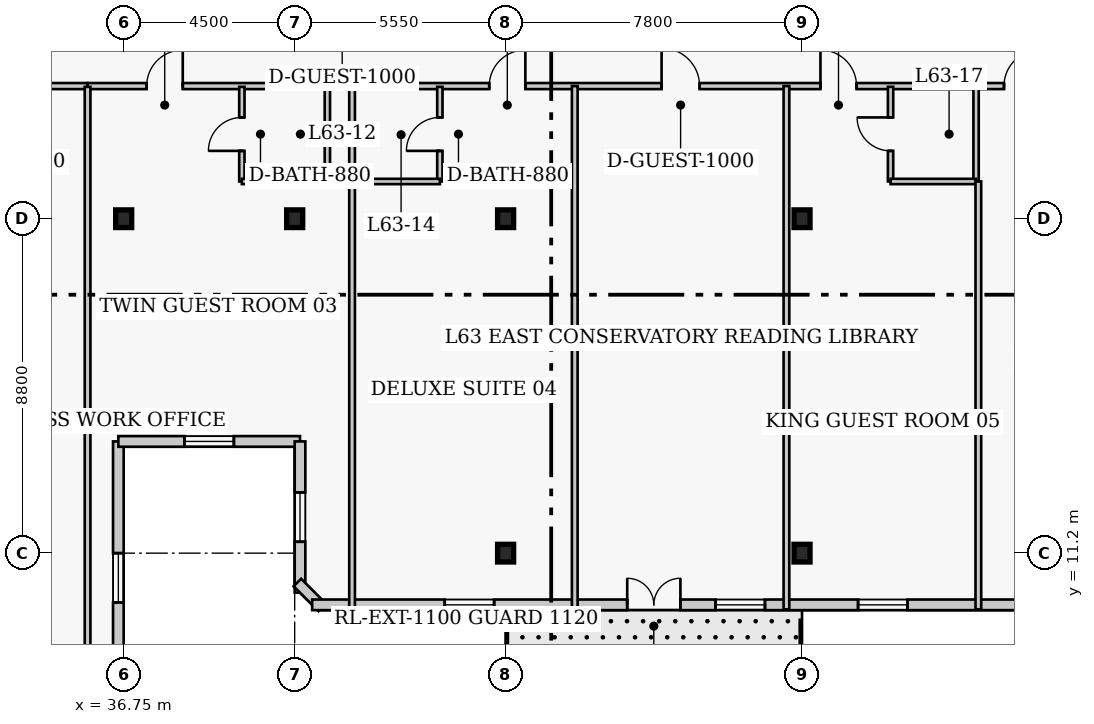
"""IFC4 building model, lengths in metres.
Left out: names, types, materials, properties, quantities, classifications, styles, units other than length and angle.
Written with IfcOpenShell. Run it as: python <this file> out.ifc"""

import sys

from ifc_helpers import new_model, si_unit, direction, frame, frame_2d, origin, origin_2d, place, context, subcontext, project, spatial, rectangle, i_section, extrude, element, fill, save


model = new_model("IFC4")
c1 = context("Model", 3, precision=1e-05, world=origin(), true_north=direction((0.0, 1.0)))
c2 = subcontext(c1, "Body", "Model", "MODEL_VIEW")
j1 = project(units=[si_unit("LENGTHUNIT", "METRE"), si_unit("PLANEANGLEUNIT", "RADIAN")], contexts=[c1])
p1 = place(None, origin())
s1 = spatial("IfcSite", under=j1, at=p1, CompositionType="ELEMENT")
p2 = place(p1, origin())
s2 = spatial("IfcBuilding", under=s1, at=p2, CompositionType="ELEMENT")
p3 = place(p2, frame((0.0, 0.0, 253.4)))
s3 = spatial("IfcBuildingStorey", under=s2, at=p3, CompositionType="ELEMENT", Elevation=253.4)
for number, where, z_axis, x_axis in (
    (1, (36.75, 20.0, 0.0), (0.0, 0.0, 1.0), (1.0, 0.0, 0.0)),
    (2, (41.25, 20.0, 0.0), (0.0, 0.0, 1.0), (1.0, 0.0, 0.0)),
    (3, (46.8, 11.2, 0.0), (0.0, 0.0, 1.0), (1.0, 0.0, 0.0)),
    (4, (46.8, 20.0, 0.0), (0.0, 0.0, 1.0), (1.0, 0.0, 0.0)),
    (5, (54.6, 11.2, 0.0), (0.0, 0.0, 1.0), (1.0, 0.0, 0.0)),
    (6, (54.6, 20.0, 0.0), (0.0, 0.0, 1.0), (1.0, 0.0, 0.0)),
):
    element("IfcColumn", number, at=place(p3, frame(where, z_axis=z_axis, x_axis=x_axis)), inside=s3, PredefinedType="COLUMN", context=c2, shape_type="SweptSolid", body=[
        extrude(i_section(OverallWidth=0.422, OverallDepth=0.465, WebThickness=0.045, FlangeThickness=0.073, FilletRadius=0.017, at=origin_2d()), origin(), (0.0, 0.0, 1.0), 4.0),
    ])
p4 = place(p3, frame((36.61, 6.96, 0.0), z_axis=(0.0, 0.0, 1.0), x_axis=(0.0, 1.0, 0.0)))
e7 = element("IfcWall", 7, at=p4, inside=s3, PredefinedType="SOLIDWALL", context=c2, shape_type="SweptSolid", body=[
    extrude(rectangle(XDim=7.18, YDim=0.28, at=frame_2d((3.59, 0.0))), origin(), (0.0, 0.0, 1.0), 3.76),
])
p5 = place(p4, frame((2.94, 0.0, 0.85)))
e8 = element("IfcOpeningElement", 8, at=p5, cuts=e7, PredefinedType="OPENING", context=c2, shape_type="SweptSolid", body=[
    extrude(rectangle(XDim=1.3, YDim=1.7, at=frame_2d((0.65, 0.85))), frame((0.0, 0.15, 0.0), z_axis=(0.0, -1.0, 0.0), x_axis=(1.0, 0.0, 0.0)), (0.0, 0.0, 1.0), 0.3),
])
p6 = place(p3, frame((36.61, 14.14, 0.0), z_axis=(0.0, 0.0, 1.0), x_axis=(1.0, 0.0, 0.0)))
e9 = element("IfcWall", 9, at=p6, inside=s3, PredefinedType="SOLIDWALL", context=c2, shape_type="SweptSolid", body=[
    extrude(rectangle(XDim=4.78, YDim=0.28, at=frame_2d((2.39, 0.0))), origin(), (0.0, 0.0, 1.0), 3.76),
])
p7 = place(p6, frame((1.74, 0.0, 0.85)))
e10 = element("IfcOpeningElement", 10, at=p7, cuts=e9, PredefinedType="OPENING", context=c2, shape_type="SweptSolid", body=[
    extrude(rectangle(XDim=1.3, YDim=1.7, at=frame_2d((0.65, 0.85))), frame((0.0, 0.15, 0.0), z_axis=(0.0, -1.0, 0.0), x_axis=(1.0, 0.0, 0.0)), (0.0, 0.0, 1.0), 0.3),
])
p8 = place(p3, frame((41.39, 14.14, 0.0), z_axis=(0.0, 0.0, 1.0), x_axis=(0.0, -1.0, 0.0)))
e11 = element("IfcWall", 11, at=p8, inside=s3, PredefinedType="SOLIDWALL", context=c2, shape_type="SweptSolid", body=[
    extrude(rectangle(XDim=3.98, YDim=0.28, at=frame_2d((1.99, 0.0))), origin(), (0.0, 0.0, 1.0), 3.76),
])
p9 = place(p8, frame((1.34, 0.0, 0.85)))
e12 = element("IfcOpeningElement", 12, at=p9, cuts=e11, PredefinedType="OPENING", context=c2, shape_type="SweptSolid", body=[
    extrude(rectangle(XDim=1.3, YDim=1.7, at=frame_2d((0.65, 0.85))), frame((0.0, 0.15, 0.0), z_axis=(0.0, -1.0, 0.0), x_axis=(1.0, 0.0, 0.0)), (0.0, 0.0, 1.0), 0.3),
])
p10 = place(p3, frame((41.321, 10.427, 0.0), z_axis=(0.0, 0.0, 1.0), x_axis=(0.707106781187, -0.707106781187, 0.0)))
e13 = element("IfcWall", 13, at=p10, inside=s3, PredefinedType="SOLIDWALL", context=c2, shape_type="SweptSolid", body=[
    extrude(rectangle(XDim=0.928, YDim=0.28, at=frame_2d((0.464, 0.0))), origin(), (0.0, 0.0, 1.0), 3.76),
])
p11 = place(p3, frame((41.71, 9.84, 0.0), z_axis=(0.0, 0.0, 1.0), x_axis=(1.0, 0.0, 0.0)))
e14 = element("IfcWall", 14, at=p11, inside=s3, PredefinedType="SOLIDWALL", context=c2, shape_type="SweptSolid", body=[
    extrude(rectangle(XDim=24.83, YDim=0.28, at=frame_2d((12.415, 0.0))), origin(), (0.0, 0.0, 1.0), 3.76),
])
p12 = place(p11, frame((8.29, 0.0, 0.0)))
e15 = element("IfcOpeningElement", 15, at=p12, cuts=e14, PredefinedType="OPENING", context=c2, shape_type="SweptSolid", body=[
    extrude(rectangle(XDim=1.4, YDim=2.15, at=frame_2d((0.7, 1.075))), frame((0.0, 0.15, 0.0), z_axis=(0.0, -1.0, 0.0), x_axis=(1.0, 0.0, 0.0)), (0.0, 0.0, 1.0), 0.3),
])
p13 = place(p11, frame((3.488, 0.0, 0.85)))
e16 = element("IfcOpeningElement", 16, at=p13, cuts=e14, PredefinedType="OPENING", context=c2, shape_type="SweptSolid", body=[
    extrude(rectangle(XDim=1.3, YDim=1.7, at=frame_2d((0.65, 0.85))), frame((0.0, 0.15, 0.0), z_axis=(0.0, -1.0, 0.0), x_axis=(1.0, 0.0, 0.0)), (0.0, 0.0, 1.0), 0.3),
])
p14 = place(p11, frame((10.615, 0.0, 0.85)))
e17 = element("IfcOpeningElement", 17, at=p14, cuts=e14, PredefinedType="OPENING", context=c2, shape_type="SweptSolid", body=[
    extrude(rectangle(XDim=1.3, YDim=1.7, at=frame_2d((0.65, 0.85))), frame((0.0, 0.15, 0.0), z_axis=(0.0, -1.0, 0.0), x_axis=(1.0, 0.0, 0.0)), (0.0, 0.0, 1.0), 0.3),
])
p15 = place(p11, frame((18.892, 0.0, 0.85)))
e18 = element("IfcOpeningElement", 18, at=p15, cuts=e14, PredefinedType="OPENING", context=c2, shape_type="SweptSolid", body=[
    extrude(rectangle(XDim=1.3, YDim=1.7, at=frame_2d((0.65, 0.85))), frame((0.0, 0.15, 0.0), z_axis=(0.0, -1.0, 0.0), x_axis=(1.0, 0.0, 0.0)), (0.0, 0.0, 1.0), 0.3),
])
p16 = place(p11, frame((14.365, 0.0, 0.85)))
e19 = element("IfcOpeningElement", 19, at=p16, cuts=e14, PredefinedType="OPENING", context=c2, shape_type="SweptSolid", body=[
    extrude(rectangle(XDim=1.3, YDim=1.7, at=frame_2d((0.65, 0.85))), frame((0.0, 0.15, 0.0), z_axis=(0.0, -1.0, 0.0), x_axis=(1.0, 0.0, 0.0)), (0.0, 0.0, 1.0), 0.3),
])
p17 = place(p3, frame((19.9, 23.49, 0.0), z_axis=(0.0, 0.0, 1.0), x_axis=(1.0, 0.0, 0.0)))
e20 = element("IfcWall", 20, at=p17, inside=s3, PredefinedType="PARTITIONING", context=c2, shape_type="SweptSolid", body=[
    extrude(rectangle(XDim=15.9, YDim=0.16, at=frame_2d((7.95, 0.0))), origin(), (0.0, 0.0, 1.0), 3.76),
])
p18 = place(p17, frame((3.61, 0.0, 0.0)))
e21 = element("IfcOpeningElement", 21, at=p18, cuts=e20, PredefinedType="OPENING", context=c2, shape_type="SweptSolid", body=[
    extrude(rectangle(XDim=0.95, YDim=2.1, at=frame_2d((0.475, 1.05))), frame((0.0, 0.09, 0.0), z_axis=(0.0, -1.0, 0.0), x_axis=(1.0, 0.0, 0.0)), (0.0, 0.0, 1.0), 0.18),
])
p19 = place(p17, frame((9.005, 0.0, 0.0)))
e22 = element("IfcOpeningElement", 22, at=p19, cuts=e20, PredefinedType="OPENING", context=c2, shape_type="SweptSolid", body=[
    extrude(rectangle(XDim=0.95, YDim=2.1, at=frame_2d((0.475, 1.05))), frame((0.0, 0.09, 0.0), z_axis=(0.0, -1.0, 0.0), x_axis=(1.0, 0.0, 0.0)), (0.0, 0.0, 1.0), 0.18),
])
p20 = place(p17, frame((12.875, 0.0, 0.0)))
e23 = element("IfcOpeningElement", 23, at=p20, cuts=e20, PredefinedType="OPENING", context=c2, shape_type="SweptSolid", body=[
    extrude(rectangle(XDim=1.0, YDim=2.15, at=frame_2d((0.5, 1.075))), frame((0.0, 0.09, 0.0), z_axis=(0.0, -1.0, 0.0), x_axis=(1.0, 0.0, 0.0)), (0.0, 0.0, 1.0), 0.18),
])
p21 = place(p3, frame((35.8, 23.49, 0.0), z_axis=(0.0, 0.0, 1.0), x_axis=(1.0, 0.0, 0.0)))
e24 = element("IfcWall", 24, at=p21, inside=s3, PredefinedType="PARTITIONING", context=c2, shape_type="SweptSolid", body=[
    extrude(rectangle(XDim=25.66, YDim=0.16, at=frame_2d((12.83, 0.0))), origin(), (0.0, 0.0, 1.0), 3.76),
])
p22 = place(p21, frame((1.555, 0.0, 0.0)))
e25 = element("IfcOpeningElement", 25, at=p22, cuts=e24, PredefinedType="OPENING", context=c2, shape_type="SweptSolid", body=[
    extrude(rectangle(XDim=0.95, YDim=2.1, at=frame_2d((0.475, 1.05))), frame((0.0, 0.09, 0.0), z_axis=(0.0, -1.0, 0.0), x_axis=(1.0, 0.0, 0.0)), (0.0, 0.0, 1.0), 0.18),
])
p23 = place(p21, frame((10.57, 0.0, 0.0)))
e26 = element("IfcOpeningElement", 26, at=p23, cuts=e24, PredefinedType="OPENING", context=c2, shape_type="SweptSolid", body=[
    extrude(rectangle(XDim=0.95, YDim=2.1, at=frame_2d((0.475, 1.05))), frame((0.0, 0.09, 0.0), z_axis=(0.0, -1.0, 0.0), x_axis=(1.0, 0.0, 0.0)), (0.0, 0.0, 1.0), 0.18),
])
p24 = place(p21, frame((15.105, 0.0, 0.0)))
e27 = element("IfcOpeningElement", 27, at=p24, cuts=e24, PredefinedType="OPENING", context=c2, shape_type="SweptSolid", body=[
    extrude(rectangle(XDim=1.0, YDim=2.15, at=frame_2d((0.5, 1.075))), frame((0.0, 0.09, 0.0), z_axis=(0.0, -1.0, 0.0), x_axis=(1.0, 0.0, 0.0)), (0.0, 0.0, 1.0), 0.18),
])
p25 = place(p21, frame((19.285, 0.0, 0.0)))
e28 = element("IfcOpeningElement", 28, at=p25, cuts=e24, PredefinedType="OPENING", context=c2, shape_type="SweptSolid", body=[
    extrude(rectangle(XDim=0.95, YDim=2.1, at=frame_2d((0.475, 1.05))), frame((0.0, 0.09, 0.0), z_axis=(0.0, -1.0, 0.0), x_axis=(1.0, 0.0, 0.0)), (0.0, 0.0, 1.0), 0.18),
])
p26 = place(p21, frame((24.115, 0.0, 0.0)))
e29 = element("IfcOpeningElement", 29, at=p26, cuts=e24, PredefinedType="OPENING", context=c2, shape_type="SweptSolid", body=[
    extrude(rectangle(XDim=0.95, YDim=2.1, at=frame_2d((0.475, 1.05))), frame((0.0, 0.09, 0.0), z_axis=(0.0, -1.0, 0.0), x_axis=(1.0, 0.0, 0.0)), (0.0, 0.0, 1.0), 0.18),
])
p27 = place(p3, frame((35.8, 6.52, 0.0), z_axis=(0.0, 0.0, 1.0), x_axis=(0.0, 1.0, 0.0)))
e30 = element("IfcWall", 30, at=p27, inside=s3, PredefinedType="PARTITIONING", context=c2, shape_type="SweptSolid", body=[
    extrude(rectangle(XDim=16.95, YDim=0.15, at=frame_2d((8.475, 0.0))), origin(), (0.0, 0.0, 1.0), 3.76),
])
p28 = place(p3, frame((39.86, 20.98, 0.0), z_axis=(0.0, 0.0, 1.0), x_axis=(0.0, 1.0, 0.0)))
e31 = element("IfcWall", 31, at=p28, inside=s3, PredefinedType="PLUMBINGWALL", context=c2, shape_type="SweptSolid", body=[
    extrude(rectangle(XDim=2.49, YDim=0.14, at=frame_2d((1.245, 0.0))), origin(), (0.0, 0.0, 1.0), 3.76),
])
p29 = place(p28, frame((0.805, 0.0, 0.0)))
e32 = element("IfcOpeningElement", 32, at=p29, cuts=e31, PredefinedType="OPENING", context=c2, shape_type="SweptSolid", body=[
    extrude(rectangle(XDim=0.88, YDim=2.05, at=frame_2d((0.44, 1.025))), frame((0.0, 0.08, 0.0), z_axis=(0.0, -1.0, 0.0), x_axis=(1.0, 0.0, 0.0)), (0.0, 0.0, 1.0), 0.16),
])
p30 = place(p3, frame((42.11, 20.98, 0.0), z_axis=(0.0, 0.0, 1.0), x_axis=(0.0, 1.0, 0.0)))
e33 = element("IfcWall", 33, at=p30, inside=s3, PredefinedType="PLUMBINGWALL", context=c2, shape_type="SweptSolid", body=[
    extrude(rectangle(XDim=2.49, YDim=0.14, at=frame_2d((1.245, 0.0))), origin(), (0.0, 0.0, 1.0), 3.76),
])
p31 = place(p3, frame((39.86, 20.98, 0.0), z_axis=(0.0, 0.0, 1.0), x_axis=(1.0, 0.0, 0.0)))
e34 = element("IfcWall", 34, at=p31, inside=s3, PredefinedType="PLUMBINGWALL", context=c2, shape_type="SweptSolid", body=[
    extrude(rectangle(XDim=2.25, YDim=0.14, at=frame_2d((1.125, 0.0))), origin(), (0.0, 0.0, 1.0), 3.76),
])
p32 = place(p3, frame((42.76, 9.72, 0.0), z_axis=(0.0, 0.0, 1.0), x_axis=(0.0, 1.0, 0.0)))
e35 = element("IfcWall", 35, at=p32, inside=s3, PredefinedType="PARTITIONING", context=c2, shape_type="SweptSolid", body=[
    extrude(rectangle(XDim=13.77, YDim=0.15, at=frame_2d((6.885, 0.0))), origin(), (0.0, 0.0, 1.0), 3.76),
])
p33 = place(p3, frame((45.07, 20.98, 0.0), z_axis=(0.0, 0.0, 1.0), x_axis=(0.0, 1.0, 0.0)))
e36 = element("IfcWall", 36, at=p33, inside=s3, PredefinedType="PLUMBINGWALL", context=c2, shape_type="SweptSolid", body=[
    extrude(rectangle(XDim=2.49, YDim=0.14, at=frame_2d((1.245, 0.0))), origin(), (0.0, 0.0, 1.0), 3.76),
])
p34 = place(p33, frame((0.805, 0.0, 0.0)))
e37 = element("IfcOpeningElement", 37, at=p34, cuts=e36, PredefinedType="OPENING", context=c2, shape_type="SweptSolid", body=[
    extrude(rectangle(XDim=0.88, YDim=2.05, at=frame_2d((0.44, 1.025))), frame((0.0, 0.08, 0.0), z_axis=(0.0, -1.0, 0.0), x_axis=(1.0, 0.0, 0.0)), (0.0, 0.0, 1.0), 0.16),
])
p35 = place(p3, frame((42.82, 20.98, 0.0), z_axis=(0.0, 0.0, 1.0), x_axis=(1.0, 0.0, 0.0)))
e38 = element("IfcWall", 38, at=p35, inside=s3, PredefinedType="PLUMBINGWALL", context=c2, shape_type="SweptSolid", body=[
    extrude(rectangle(XDim=2.25, YDim=0.14, at=frame_2d((1.125, 0.0))), origin(), (0.0, 0.0, 1.0), 3.76),
])
for number, where, z_axis, x_axis in (
    (39, (48.62, 9.72, 0.0), (0.0, 0.0, 1.0), (0.0, 1.0, 0.0)),
    (40, (54.19, 9.72, 0.0), (0.0, 0.0, 1.0), (0.0, 1.0, 0.0)),
):
    element("IfcWall", number, at=place(p3, frame(where, z_axis=z_axis, x_axis=x_axis)), inside=s3, PredefinedType="PARTITIONING", context=c2, shape_type="SweptSolid", body=[
        extrude(rectangle(XDim=13.77, YDim=0.15, at=frame_2d((6.885, 0.0))), origin(), (0.0, 0.0, 1.0), 3.76),
    ])
p36 = place(p3, frame((56.93, 20.98, 0.0), z_axis=(0.0, 0.0, 1.0), x_axis=(0.0, 1.0, 0.0)))
e41 = element("IfcWall", 41, at=p36, inside=s3, PredefinedType="PLUMBINGWALL", context=c2, shape_type="SweptSolid", body=[
    extrude(rectangle(XDim=2.49, YDim=0.14, at=frame_2d((1.245, 0.0))), origin(), (0.0, 0.0, 1.0), 3.76),
])
p37 = place(p36, frame((0.805, 0.0, 0.0)))
e42 = element("IfcOpeningElement", 42, at=p37, cuts=e41, PredefinedType="OPENING", context=c2, shape_type="SweptSolid", body=[
    extrude(rectangle(XDim=0.88, YDim=2.05, at=frame_2d((0.44, 1.025))), frame((0.0, 0.08, 0.0), z_axis=(0.0, -1.0, 0.0), x_axis=(1.0, 0.0, 0.0)), (0.0, 0.0, 1.0), 0.16),
])
p38 = place(p3, frame((59.18, 20.98, 0.0), z_axis=(0.0, 0.0, 1.0), x_axis=(0.0, 1.0, 0.0)))
e43 = element("IfcWall", 43, at=p38, inside=s3, PredefinedType="PLUMBINGWALL", context=c2, shape_type="SweptSolid", body=[
    extrude(rectangle(XDim=2.49, YDim=0.14, at=frame_2d((1.245, 0.0))), origin(), (0.0, 0.0, 1.0), 3.76),
])
p39 = place(p3, frame((56.93, 20.98, 0.0), z_axis=(0.0, 0.0, 1.0), x_axis=(1.0, 0.0, 0.0)))
e44 = element("IfcWall", 44, at=p39, inside=s3, PredefinedType="PLUMBINGWALL", context=c2, shape_type="SweptSolid", body=[
    extrude(rectangle(XDim=2.25, YDim=0.14, at=frame_2d((1.125, 0.0))), origin(), (0.0, 0.0, 1.0), 3.76),
])
p40 = place(p3, frame((59.24, 9.72, 0.0), z_axis=(0.0, 0.0, 1.0), x_axis=(0.0, 1.0, 0.0)))
e45 = element("IfcWall", 45, at=p40, inside=s3, PredefinedType="PARTITIONING", context=c2, shape_type="SweptSolid", body=[
    extrude(rectangle(XDim=11.26, YDim=0.15, at=frame_2d((5.63, 0.0))), origin(), (0.0, 0.0, 1.0), 3.76),
])
p41 = place(p5, origin())
e46 = element("IfcWindow", 46, at=p41, inside=s3, PartitioningType="SINGLE_PANEL", PredefinedType="WINDOW", context=c2, shape_type="SweptSolid", body=[
    extrude(rectangle(XDim=1.3, YDim=1.7, at=frame_2d((0.65, 0.85))), frame((0.0, 0.03, 0.0), z_axis=(0.0, -1.0, 0.0), x_axis=(1.0, 0.0, 0.0)), (0.0, 0.0, 1.0), 0.06),
])
fill(e8, e46)
p42 = place(p7, origin())
e47 = element("IfcWindow", 47, at=p42, inside=s3, PartitioningType="SINGLE_PANEL", PredefinedType="WINDOW", context=c2, shape_type="SweptSolid", body=[
    extrude(rectangle(XDim=1.3, YDim=1.7, at=frame_2d((0.65, 0.85))), frame((0.0, 0.03, 0.0), z_axis=(0.0, -1.0, 0.0), x_axis=(1.0, 0.0, 0.0)), (0.0, 0.0, 1.0), 0.06),
])
fill(e10, e47)
p43 = place(p9, origin())
e48 = element("IfcWindow", 48, at=p43, inside=s3, PartitioningType="SINGLE_PANEL", PredefinedType="WINDOW", context=c2, shape_type="SweptSolid", body=[
    extrude(rectangle(XDim=1.3, YDim=1.7, at=frame_2d((0.65, 0.85))), frame((0.0, 0.03, 0.0), z_axis=(0.0, -1.0, 0.0), x_axis=(1.0, 0.0, 0.0)), (0.0, 0.0, 1.0), 0.06),
])
fill(e12, e48)
p44 = place(p12, origin())
e49 = element("IfcDoor", 49, at=p44, inside=s3, OperationType="DOUBLE_DOOR_SINGLE_SWING", PredefinedType="DOOR", context=c2, shape_type="SweptSolid", body=[
    extrude(rectangle(XDim=1.4, YDim=2.15, at=frame_2d((0.7, 1.075))), frame((0.0, 0.025, 0.0), z_axis=(0.0, -1.0, 0.0), x_axis=(1.0, 0.0, 0.0)), (0.0, 0.0, 1.0), 0.05),
])
fill(e15, e49)
p45 = place(p13, origin())
e50 = element("IfcWindow", 50, at=p45, inside=s3, PartitioningType="SINGLE_PANEL", PredefinedType="WINDOW", context=c2, shape_type="SweptSolid", body=[
    extrude(rectangle(XDim=1.3, YDim=1.7, at=frame_2d((0.65, 0.85))), frame((0.0, 0.03, 0.0), z_axis=(0.0, -1.0, 0.0), x_axis=(1.0, 0.0, 0.0)), (0.0, 0.0, 1.0), 0.06),
])
fill(e16, e50)
p46 = place(p14, origin())
e51 = element("IfcWindow", 51, at=p46, inside=s3, PartitioningType="SINGLE_PANEL", PredefinedType="WINDOW", context=c2, shape_type="SweptSolid", body=[
    extrude(rectangle(XDim=1.3, YDim=1.7, at=frame_2d((0.65, 0.85))), frame((0.0, 0.03, 0.0), z_axis=(0.0, -1.0, 0.0), x_axis=(1.0, 0.0, 0.0)), (0.0, 0.0, 1.0), 0.06),
])
fill(e17, e51)
p47 = place(p16, origin())
e52 = element("IfcWindow", 52, at=p47, inside=s3, PartitioningType="SINGLE_PANEL", PredefinedType="WINDOW", context=c2, shape_type="SweptSolid", body=[
    extrude(rectangle(XDim=1.3, YDim=1.7, at=frame_2d((0.65, 0.85))), frame((0.0, 0.03, 0.0), z_axis=(0.0, -1.0, 0.0), x_axis=(1.0, 0.0, 0.0)), (0.0, 0.0, 1.0), 0.06),
])
fill(e19, e52)
p48 = place(p29, origin())
e53 = element("IfcDoor", 53, at=p48, inside=s3, OperationType="SINGLE_SWING_LEFT", PredefinedType="DOOR", context=c2, shape_type="SweptSolid", body=[
    extrude(rectangle(XDim=0.88, YDim=2.05, at=frame_2d((0.44, 1.025))), frame((0.0, 0.025, 0.0), z_axis=(0.0, -1.0, 0.0), x_axis=(1.0, 0.0, 0.0)), (0.0, 0.0, 1.0), 0.05),
])
fill(e32, e53)
p49 = place(p22, origin())
e54 = element("IfcDoor", 54, at=p49, inside=s3, OperationType="SINGLE_SWING_RIGHT", PredefinedType="DOOR", context=c2, shape_type="SweptSolid", body=[
    extrude(rectangle(XDim=0.95, YDim=2.1, at=frame_2d((0.475, 1.05))), frame((0.0, 0.025, 0.0), z_axis=(0.0, -1.0, 0.0), x_axis=(1.0, 0.0, 0.0)), (0.0, 0.0, 1.0), 0.05),
])
fill(e25, e54)
p50 = place(p34, origin())
e55 = element("IfcDoor", 55, at=p50, inside=s3, OperationType="SINGLE_SWING_LEFT", PredefinedType="DOOR", context=c2, shape_type="SweptSolid", body=[
    extrude(rectangle(XDim=0.88, YDim=2.05, at=frame_2d((0.44, 1.025))), frame((0.0, 0.025, 0.0), z_axis=(0.0, -1.0, 0.0), x_axis=(1.0, 0.0, 0.0)), (0.0, 0.0, 1.0), 0.05),
])
fill(e37, e55)
p51 = place(p23, origin())
e56 = element("IfcDoor", 56, at=p51, inside=s3, OperationType="SINGLE_SWING_RIGHT", PredefinedType="DOOR", context=c2, shape_type="SweptSolid", body=[
    extrude(rectangle(XDim=0.95, YDim=2.1, at=frame_2d((0.475, 1.05))), frame((0.0, 0.025, 0.0), z_axis=(0.0, -1.0, 0.0), x_axis=(1.0, 0.0, 0.0)), (0.0, 0.0, 1.0), 0.05),
])
fill(e26, e56)
p52 = place(p24, origin())
e57 = element("IfcDoor", 57, at=p52, inside=s3, OperationType="SINGLE_SWING_LEFT", PredefinedType="DOOR", context=c2, shape_type="SweptSolid", body=[
    extrude(rectangle(XDim=1.0, YDim=2.15, at=frame_2d((0.5, 1.075))), frame((0.0, 0.025, 0.0), z_axis=(0.0, -1.0, 0.0), x_axis=(1.0, 0.0, 0.0)), (0.0, 0.0, 1.0), 0.05),
])
fill(e27, e57)
p53 = place(p37, origin())
e58 = element("IfcDoor", 58, at=p53, inside=s3, OperationType="SINGLE_SWING_RIGHT", PredefinedType="DOOR", context=c2, shape_type="SweptSolid", body=[
    extrude(rectangle(XDim=0.88, YDim=2.05, at=frame_2d((0.44, 1.025))), frame((0.0, 0.025, 0.0), z_axis=(0.0, -1.0, 0.0), x_axis=(1.0, 0.0, 0.0)), (0.0, 0.0, 1.0), 0.05),
])
fill(e42, e58)
p54 = place(p25, origin())
e59 = element("IfcDoor", 59, at=p54, inside=s3, OperationType="SINGLE_SWING_LEFT", PredefinedType="DOOR", context=c2, shape_type="SweptSolid", body=[
    extrude(rectangle(XDim=0.95, YDim=2.1, at=frame_2d((0.475, 1.05))), frame((0.0, 0.025, 0.0), z_axis=(0.0, -1.0, 0.0), x_axis=(1.0, 0.0, 0.0)), (0.0, 0.0, 1.0), 0.05),
])
fill(e28, e59)
p55 = place(p26, origin())
e60 = element("IfcDoor", 60, at=p55, inside=s3, OperationType="SINGLE_SWING_RIGHT", PredefinedType="DOOR", context=c2, shape_type="SweptSolid", body=[
    extrude(rectangle(XDim=0.95, YDim=2.1, at=frame_2d((0.475, 1.05))), frame((0.0, 0.025, 0.0), z_axis=(0.0, -1.0, 0.0), x_axis=(1.0, 0.0, 0.0)), (0.0, 0.0, 1.0), 0.05),
])
fill(e29, e60)
save(model, sys.argv[1])
